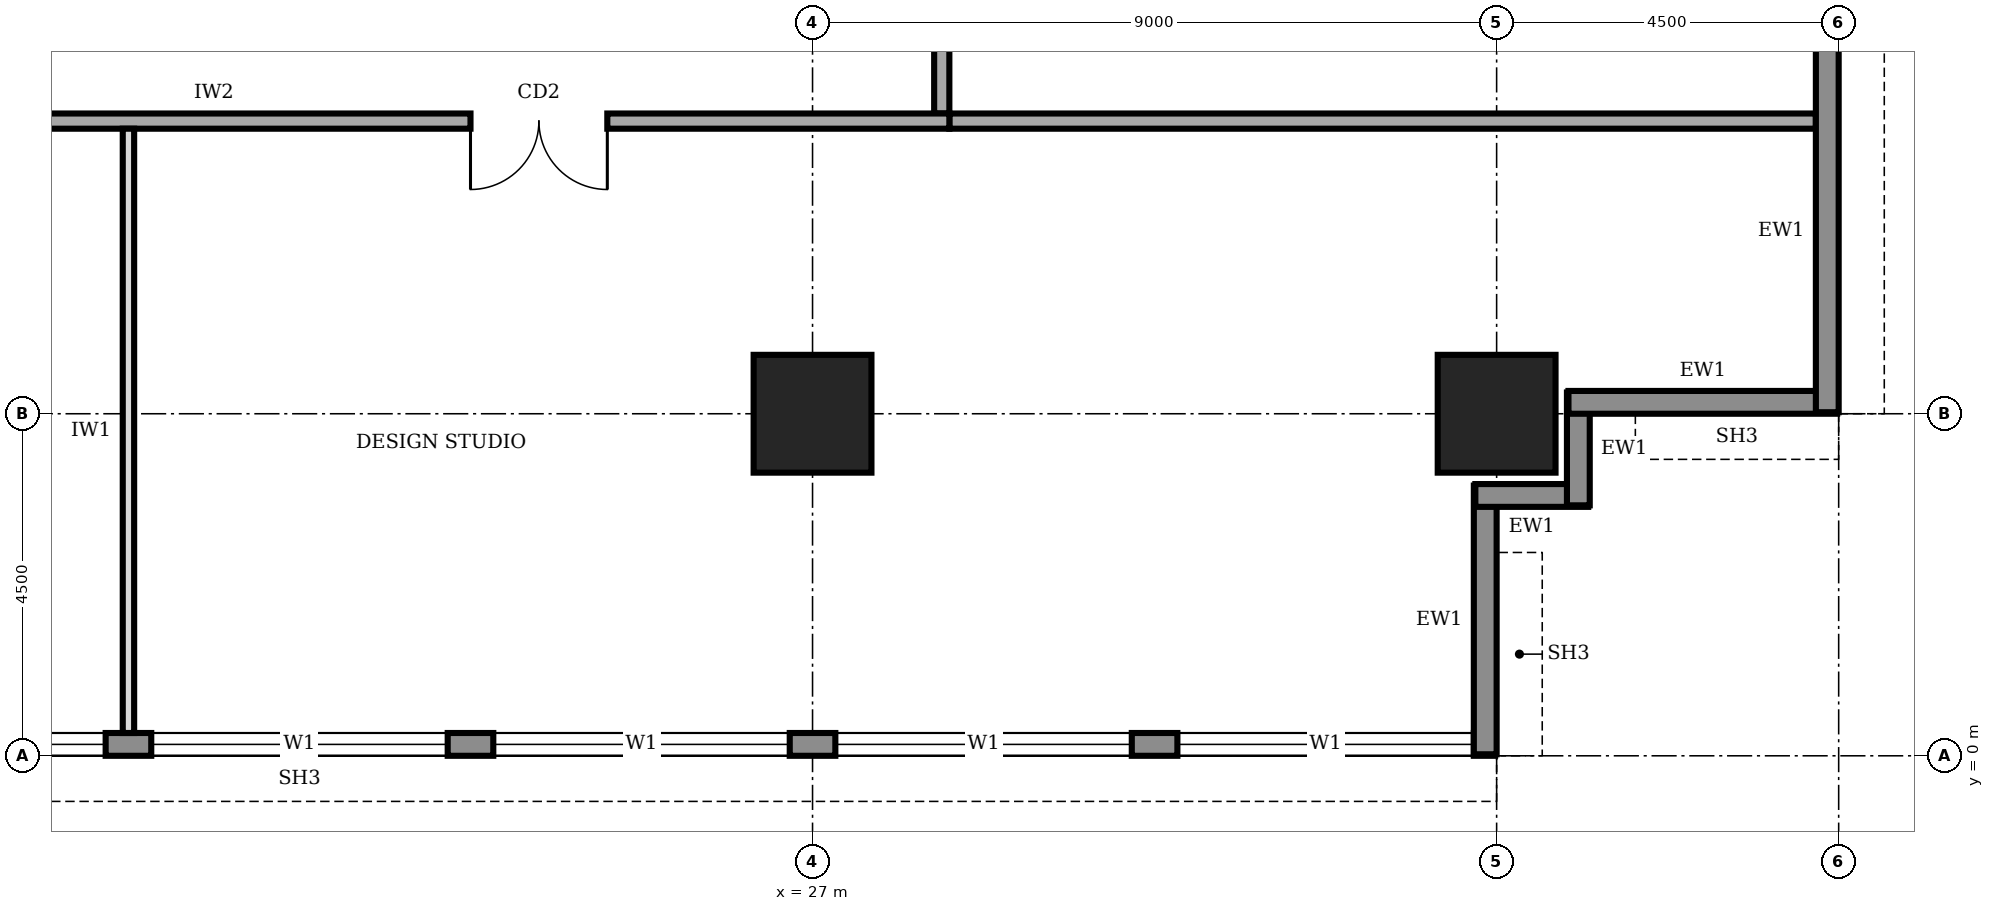
"""IFC4 building model, lengths in metres.
Left out: names, types, materials, properties, quantities, classifications, styles, units other than length and angle.
Written with IfcOpenShell. Run it as: python <this file> out.ifc"""

import sys

from ifc_helpers import new_model, si_unit, direction, frame, frame_2d, origin, origin_2d, place, context, subcontext, project, spatial, rectangle, extrude, element, fill, save


model = new_model("IFC4")
c1 = context("Model", 3, precision=1e-05, world=origin(), true_north=direction((0.0, 1.0)))
c2 = subcontext(c1, "Body", "Model", "MODEL_VIEW")
j1 = project(units=[si_unit("LENGTHUNIT", "METRE"), si_unit("PLANEANGLEUNIT", "RADIAN")], contexts=[c1])
p1 = place(None, origin())
s1 = spatial("IfcSite", under=j1, at=p1, CompositionType="ELEMENT")
p2 = place(p1, origin())
s2 = spatial("IfcBuilding", under=s1, at=p2, CompositionType="ELEMENT")
p3 = place(p2, frame((0.0, 0.0, 217.0)))
s3 = spatial("IfcBuildingStorey", under=s2, at=p3, CompositionType="ELEMENT", Elevation=217.0)
for number, where, z_axis, x_axis in (
    (1, (27.0, 4.5, 0.0), (0.0, 0.0, 1.0), (1.0, 0.0, 0.0)),
    (2, (36.0, 4.5, 0.0), (0.0, 0.0, 1.0), (1.0, 0.0, 0.0)),
):
    element("IfcColumn", number, at=place(p3, frame(where, z_axis=z_axis, x_axis=x_axis)), inside=s3, PredefinedType="COLUMN", context=c2, shape_type="SweptSolid", body=[
        extrude(rectangle(XDim=1.55, YDim=1.55, at=origin_2d()), origin(), (0.0, 0.0, 1.0), 4.0),
    ])
p4 = place(p3, frame((4.52, 0.15, 0.0), z_axis=(0.0, 0.0, 1.0), x_axis=(1.0, 0.0, 0.0)))
e3 = element("IfcWall", 3, at=p4, inside=s3, PredefinedType="STANDARD", context=c2, shape_type="SweptSolid", body=[
    extrude(rectangle(XDim=31.46, YDim=0.3, at=frame_2d((15.73, 0.0))), origin(), (0.0, 0.0, 1.0), 3.75),
])
p5 = place(p4, frame((4.78, 0.0, 0.9)))
e4 = element("IfcOpeningElement", 4, at=p5, cuts=e3, PredefinedType="OPENING", context=c2, shape_type="SweptSolid", body=[
    extrude(rectangle(XDim=3.9, YDim=2.2, at=frame_2d((1.95, 1.1))), frame((0.0, 0.16, 0.0), z_axis=(0.0, -1.0, 0.0), x_axis=(1.0, 0.0, 0.0)), (0.0, 0.0, 1.0), 0.32),
])
p6 = place(p4, frame((9.28, 0.0, 0.9)))
e5 = element("IfcOpeningElement", 5, at=p6, cuts=e3, PredefinedType="OPENING", context=c2, shape_type="SweptSolid", body=[
    extrude(rectangle(XDim=3.9, YDim=2.2, at=frame_2d((1.95, 1.1))), frame((0.0, 0.16, 0.0), z_axis=(0.0, -1.0, 0.0), x_axis=(1.0, 0.0, 0.0)), (0.0, 0.0, 1.0), 0.32),
])
p7 = place(p4, frame((13.78, 0.0, 0.9)))
e6 = element("IfcOpeningElement", 6, at=p7, cuts=e3, PredefinedType="OPENING", context=c2, shape_type="SweptSolid", body=[
    extrude(rectangle(XDim=3.9, YDim=2.2, at=frame_2d((1.95, 1.1))), frame((0.0, 0.16, 0.0), z_axis=(0.0, -1.0, 0.0), x_axis=(1.0, 0.0, 0.0)), (0.0, 0.0, 1.0), 0.32),
])
p8 = place(p4, frame((18.28, 0.0, 0.9)))
e7 = element("IfcOpeningElement", 7, at=p8, cuts=e3, PredefinedType="OPENING", context=c2, shape_type="SweptSolid", body=[
    extrude(rectangle(XDim=3.9, YDim=2.2, at=frame_2d((1.95, 1.1))), frame((0.0, 0.16, 0.0), z_axis=(0.0, -1.0, 0.0), x_axis=(1.0, 0.0, 0.0)), (0.0, 0.0, 1.0), 0.32),
])
p9 = place(p4, frame((22.78, 0.0, 0.9)))
e8 = element("IfcOpeningElement", 8, at=p9, cuts=e3, PredefinedType="OPENING", context=c2, shape_type="SweptSolid", body=[
    extrude(rectangle(XDim=3.9, YDim=2.2, at=frame_2d((1.95, 1.1))), frame((0.0, 0.16, 0.0), z_axis=(0.0, -1.0, 0.0), x_axis=(1.0, 0.0, 0.0)), (0.0, 0.0, 1.0), 0.32),
])
p10 = place(p4, frame((27.28, 0.0, 0.9)))
e9 = element("IfcOpeningElement", 9, at=p10, cuts=e3, PredefinedType="OPENING", context=c2, shape_type="SweptSolid", body=[
    extrude(rectangle(XDim=3.9, YDim=2.2, at=frame_2d((1.95, 1.1))), frame((0.0, 0.16, 0.0), z_axis=(0.0, -1.0, 0.0), x_axis=(1.0, 0.0, 0.0)), (0.0, 0.0, 1.0), 0.32),
])
p11 = place(p3, frame((35.85, 0.02, 0.0), z_axis=(0.0, 0.0, 1.0), x_axis=(0.0, 1.0, 0.0)))
e10 = element("IfcWall", 10, at=p11, inside=s3, PredefinedType="STANDARD", context=c2, shape_type="SweptSolid", body=[
    extrude(rectangle(XDim=3.535, YDim=0.3, at=frame_2d((1.768, 0.0))), origin(), (0.0, 0.0, 1.0), 2.85),
])
for number, where, z_axis, x_axis in (
    (11, (35.72, 3.425, 0.0), (0.0, 0.0, 1.0), (1.0, 0.0, 0.0)),
    (12, (37.075, 3.295, 0.0), (0.0, 0.0, 1.0), (0.0, 1.0, 0.0)),
):
    element("IfcWall", number, at=place(p3, frame(where, z_axis=z_axis, x_axis=x_axis)), inside=s3, PredefinedType="STANDARD", context=c2, shape_type="SweptSolid", body=[
        extrude(rectangle(XDim=1.485, YDim=0.3, at=frame_2d((0.743, 0.0))), origin(), (0.0, 0.0, 1.0), 3.75),
    ])
p12 = place(p3, frame((36.945, 4.65, 0.0), z_axis=(0.0, 0.0, 1.0), x_axis=(1.0, 0.0, 0.0)))
e13 = element("IfcWall", 13, at=p12, inside=s3, PredefinedType="STANDARD", context=c2, shape_type="SweptSolid", body=[
    extrude(rectangle(XDim=3.535, YDim=0.3, at=frame_2d((1.768, 0.0))), origin(), (0.0, 0.0, 1.0), 2.85),
])
p13 = place(p3, frame((40.35, 4.52, 0.0), z_axis=(0.0, 0.0, 1.0), x_axis=(0.0, 1.0, 0.0)))
e14 = element("IfcWall", 14, at=p13, inside=s3, PredefinedType="STANDARD", context=c2, shape_type="SweptSolid", body=[
    extrude(rectangle(XDim=31.46, YDim=0.3, at=frame_2d((15.73, 0.0))), origin(), (0.0, 0.0, 1.0), 3.75),
])
p14 = place(p13, frame((4.78, 0.0, 0.9)))
e15 = element("IfcOpeningElement", 15, at=p14, cuts=e14, PredefinedType="OPENING", context=c2, shape_type="SweptSolid", body=[
    extrude(rectangle(XDim=3.9, YDim=2.2, at=frame_2d((1.95, 1.1))), frame((0.0, 0.16, 0.0), z_axis=(0.0, -1.0, 0.0), x_axis=(1.0, 0.0, 0.0)), (0.0, 0.0, 1.0), 0.32),
])
p15 = place(p13, frame((9.28, 0.0, 0.9)))
e16 = element("IfcOpeningElement", 16, at=p15, cuts=e14, PredefinedType="OPENING", context=c2, shape_type="SweptSolid", body=[
    extrude(rectangle(XDim=3.9, YDim=2.2, at=frame_2d((1.95, 1.1))), frame((0.0, 0.16, 0.0), z_axis=(0.0, -1.0, 0.0), x_axis=(1.0, 0.0, 0.0)), (0.0, 0.0, 1.0), 0.32),
])
p16 = place(p13, frame((13.78, 0.0, 0.9)))
e17 = element("IfcOpeningElement", 17, at=p16, cuts=e14, PredefinedType="OPENING", context=c2, shape_type="SweptSolid", body=[
    extrude(rectangle(XDim=3.9, YDim=2.2, at=frame_2d((1.95, 1.1))), frame((0.0, 0.16, 0.0), z_axis=(0.0, -1.0, 0.0), x_axis=(1.0, 0.0, 0.0)), (0.0, 0.0, 1.0), 0.32),
])
p17 = place(p13, frame((18.28, 0.0, 0.9)))
e18 = element("IfcOpeningElement", 18, at=p17, cuts=e14, PredefinedType="OPENING", context=c2, shape_type="SweptSolid", body=[
    extrude(rectangle(XDim=3.9, YDim=2.2, at=frame_2d((1.95, 1.1))), frame((0.0, 0.16, 0.0), z_axis=(0.0, -1.0, 0.0), x_axis=(1.0, 0.0, 0.0)), (0.0, 0.0, 1.0), 0.32),
])
p18 = place(p13, frame((22.78, 0.0, 0.9)))
e19 = element("IfcOpeningElement", 19, at=p18, cuts=e14, PredefinedType="OPENING", context=c2, shape_type="SweptSolid", body=[
    extrude(rectangle(XDim=3.9, YDim=2.2, at=frame_2d((1.95, 1.1))), frame((0.0, 0.16, 0.0), z_axis=(0.0, -1.0, 0.0), x_axis=(1.0, 0.0, 0.0)), (0.0, 0.0, 1.0), 0.32),
])
p19 = place(p13, frame((27.28, 0.0, 0.9)))
e20 = element("IfcOpeningElement", 20, at=p19, cuts=e14, PredefinedType="OPENING", context=c2, shape_type="SweptSolid", body=[
    extrude(rectangle(XDim=3.9, YDim=2.2, at=frame_2d((1.95, 1.1))), frame((0.0, 0.16, 0.0), z_axis=(0.0, -1.0, 0.0), x_axis=(1.0, 0.0, 0.0)), (0.0, 0.0, 1.0), 0.32),
])
p20 = place(p3, frame((11.9, 8.35, 0.0), z_axis=(0.0, 0.0, 1.0), x_axis=(1.0, 0.0, 0.0)))
e21 = element("IfcWall", 21, at=p20, inside=s3, PredefinedType="SOLIDWALL", context=c2, shape_type="SweptSolid", body=[
    extrude(rectangle(XDim=16.9, YDim=0.2, at=frame_2d((8.45, 0.0))), origin(), (0.0, 0.0, 1.0), 3.75),
])
p21 = place(p20, frame((2.05, 0.0, 0.0)))
e22 = element("IfcOpeningElement", 22, at=p21, cuts=e21, PredefinedType="OPENING", context=c2, shape_type="SweptSolid", body=[
    extrude(rectangle(XDim=1.8, YDim=2.1, at=frame_2d((0.9, 1.05))), frame((0.0, 0.11, 0.0), z_axis=(0.0, -1.0, 0.0), x_axis=(1.0, 0.0, 0.0)), (0.0, 0.0, 1.0), 0.22),
])
p22 = place(p20, frame((10.6, 0.0, 0.0)))
e23 = element("IfcOpeningElement", 23, at=p22, cuts=e21, PredefinedType="OPENING", context=c2, shape_type="SweptSolid", body=[
    extrude(rectangle(XDim=1.8, YDim=2.1, at=frame_2d((0.9, 1.05))), frame((0.0, 0.11, 0.0), z_axis=(0.0, -1.0, 0.0), x_axis=(1.0, 0.0, 0.0)), (0.0, 0.0, 1.0), 0.22),
])
p23 = place(p3, frame((28.7, 8.45, 0.0), z_axis=(0.0, 0.0, 1.0), x_axis=(0.0, 1.0, 0.0)))
e24 = element("IfcWall", 24, at=p23, inside=s3, PredefinedType="SOLIDWALL", context=c2, shape_type="SweptSolid", body=[
    extrude(rectangle(XDim=23.8, YDim=0.2, at=frame_2d((11.9, 0.0))), origin(), (0.0, 0.0, 1.0), 3.75),
])
p24 = place(p23, frame((3.775, 0.0, 0.0)))
e25 = element("IfcOpeningElement", 25, at=p24, cuts=e24, PredefinedType="OPENING", context=c2, shape_type="SweptSolid", body=[
    extrude(rectangle(XDim=1.8, YDim=2.1, at=frame_2d((0.9, 1.05))), frame((0.0, 0.11, 0.0), z_axis=(0.0, -1.0, 0.0), x_axis=(1.0, 0.0, 0.0)), (0.0, 0.0, 1.0), 0.22),
])
p25 = place(p23, frame((11.3, 0.0, 0.0)))
e26 = element("IfcOpeningElement", 26, at=p25, cuts=e24, PredefinedType="OPENING", context=c2, shape_type="SweptSolid", body=[
    extrude(rectangle(XDim=1.0, YDim=2.1, at=frame_2d((0.5, 1.05))), frame((0.0, 0.11, 0.0), z_axis=(0.0, -1.0, 0.0), x_axis=(1.0, 0.0, 0.0)), (0.0, 0.0, 1.0), 0.22),
])
p26 = place(p23, frame((18.025, 0.0, 0.0)))
e27 = element("IfcOpeningElement", 27, at=p26, cuts=e24, PredefinedType="OPENING", context=c2, shape_type="SweptSolid", body=[
    extrude(rectangle(XDim=1.8, YDim=2.1, at=frame_2d((0.9, 1.05))), frame((0.0, 0.11, 0.0), z_axis=(0.0, -1.0, 0.0), x_axis=(1.0, 0.0, 0.0)), (0.0, 0.0, 1.0), 0.22),
])
p27 = place(p3, frame((28.8, 8.35, 0.0), z_axis=(0.0, 0.0, 1.0), x_axis=(1.0, 0.0, 0.0)))
e28 = element("IfcWall", 28, at=p27, inside=s3, PredefinedType="SOLIDWALL", context=c2, shape_type="SweptSolid", body=[
    extrude(rectangle(XDim=11.4, YDim=0.2, at=frame_2d((5.7, 0.0))), origin(), (0.0, 0.0, 1.0), 3.75),
])
p28 = place(p3, frame((18.0, 0.3, 0.0), z_axis=(0.0, 0.0, 1.0), x_axis=(0.0, 1.0, 0.0)))
e29 = element("IfcWall", 29, at=p28, inside=s3, PredefinedType="PARTITIONING", context=c2, shape_type="SweptSolid", body=[
    extrude(rectangle(XDim=7.95, YDim=0.15, at=frame_2d((3.975, 0.0))), origin(), (0.0, 0.0, 1.0), 3.75),
])
p29 = place(p6, origin())
e30 = element("IfcWindow", 30, at=p29, inside=s3, PartitioningType="SINGLE_PANEL", PredefinedType="WINDOW", context=c2, shape_type="SweptSolid", body=[
    extrude(rectangle(XDim=3.9, YDim=2.2, at=frame_2d((1.95, 1.1))), frame((0.0, 0.03, 0.0), z_axis=(0.0, -1.0, 0.0), x_axis=(1.0, 0.0, 0.0)), (0.0, 0.0, 1.0), 0.06),
])
fill(e5, e30)
p30 = place(p7, origin())
e31 = element("IfcWindow", 31, at=p30, inside=s3, PartitioningType="SINGLE_PANEL", PredefinedType="WINDOW", context=c2, shape_type="SweptSolid", body=[
    extrude(rectangle(XDim=3.9, YDim=2.2, at=frame_2d((1.95, 1.1))), frame((0.0, 0.03, 0.0), z_axis=(0.0, -1.0, 0.0), x_axis=(1.0, 0.0, 0.0)), (0.0, 0.0, 1.0), 0.06),
])
fill(e6, e31)
p31 = place(p8, origin())
e32 = element("IfcWindow", 32, at=p31, inside=s3, PartitioningType="SINGLE_PANEL", PredefinedType="WINDOW", context=c2, shape_type="SweptSolid", body=[
    extrude(rectangle(XDim=3.9, YDim=2.2, at=frame_2d((1.95, 1.1))), frame((0.0, 0.03, 0.0), z_axis=(0.0, -1.0, 0.0), x_axis=(1.0, 0.0, 0.0)), (0.0, 0.0, 1.0), 0.06),
])
fill(e7, e32)
p32 = place(p9, origin())
e33 = element("IfcWindow", 33, at=p32, inside=s3, PartitioningType="SINGLE_PANEL", PredefinedType="WINDOW", context=c2, shape_type="SweptSolid", body=[
    extrude(rectangle(XDim=3.9, YDim=2.2, at=frame_2d((1.95, 1.1))), frame((0.0, 0.03, 0.0), z_axis=(0.0, -1.0, 0.0), x_axis=(1.0, 0.0, 0.0)), (0.0, 0.0, 1.0), 0.06),
])
fill(e8, e33)
p33 = place(p10, origin())
e34 = element("IfcWindow", 34, at=p33, inside=s3, PartitioningType="SINGLE_PANEL", PredefinedType="WINDOW", context=c2, shape_type="SweptSolid", body=[
    extrude(rectangle(XDim=3.9, YDim=2.2, at=frame_2d((1.95, 1.1))), frame((0.0, 0.03, 0.0), z_axis=(0.0, -1.0, 0.0), x_axis=(1.0, 0.0, 0.0)), (0.0, 0.0, 1.0), 0.06),
])
fill(e9, e34)
p34 = place(p22, frame((1.8, 0.0, 0.0), z_axis=(0.0, 0.0, 1.0), x_axis=(-1.0, 0.0, 0.0)))
e35 = element("IfcDoor", 35, at=p34, inside=s3, OperationType="DOUBLE_DOOR_SINGLE_SWING", PredefinedType="DOOR", context=c2, shape_type="SweptSolid", body=[
    extrude(rectangle(XDim=1.8, YDim=2.1, at=frame_2d((0.9, 1.05))), frame((0.0, 0.025, 0.0), z_axis=(0.0, -1.0, 0.0), x_axis=(1.0, 0.0, 0.0)), (0.0, 0.0, 1.0), 0.05),
])
fill(e23, e35)
save(model, sys.argv[1])
